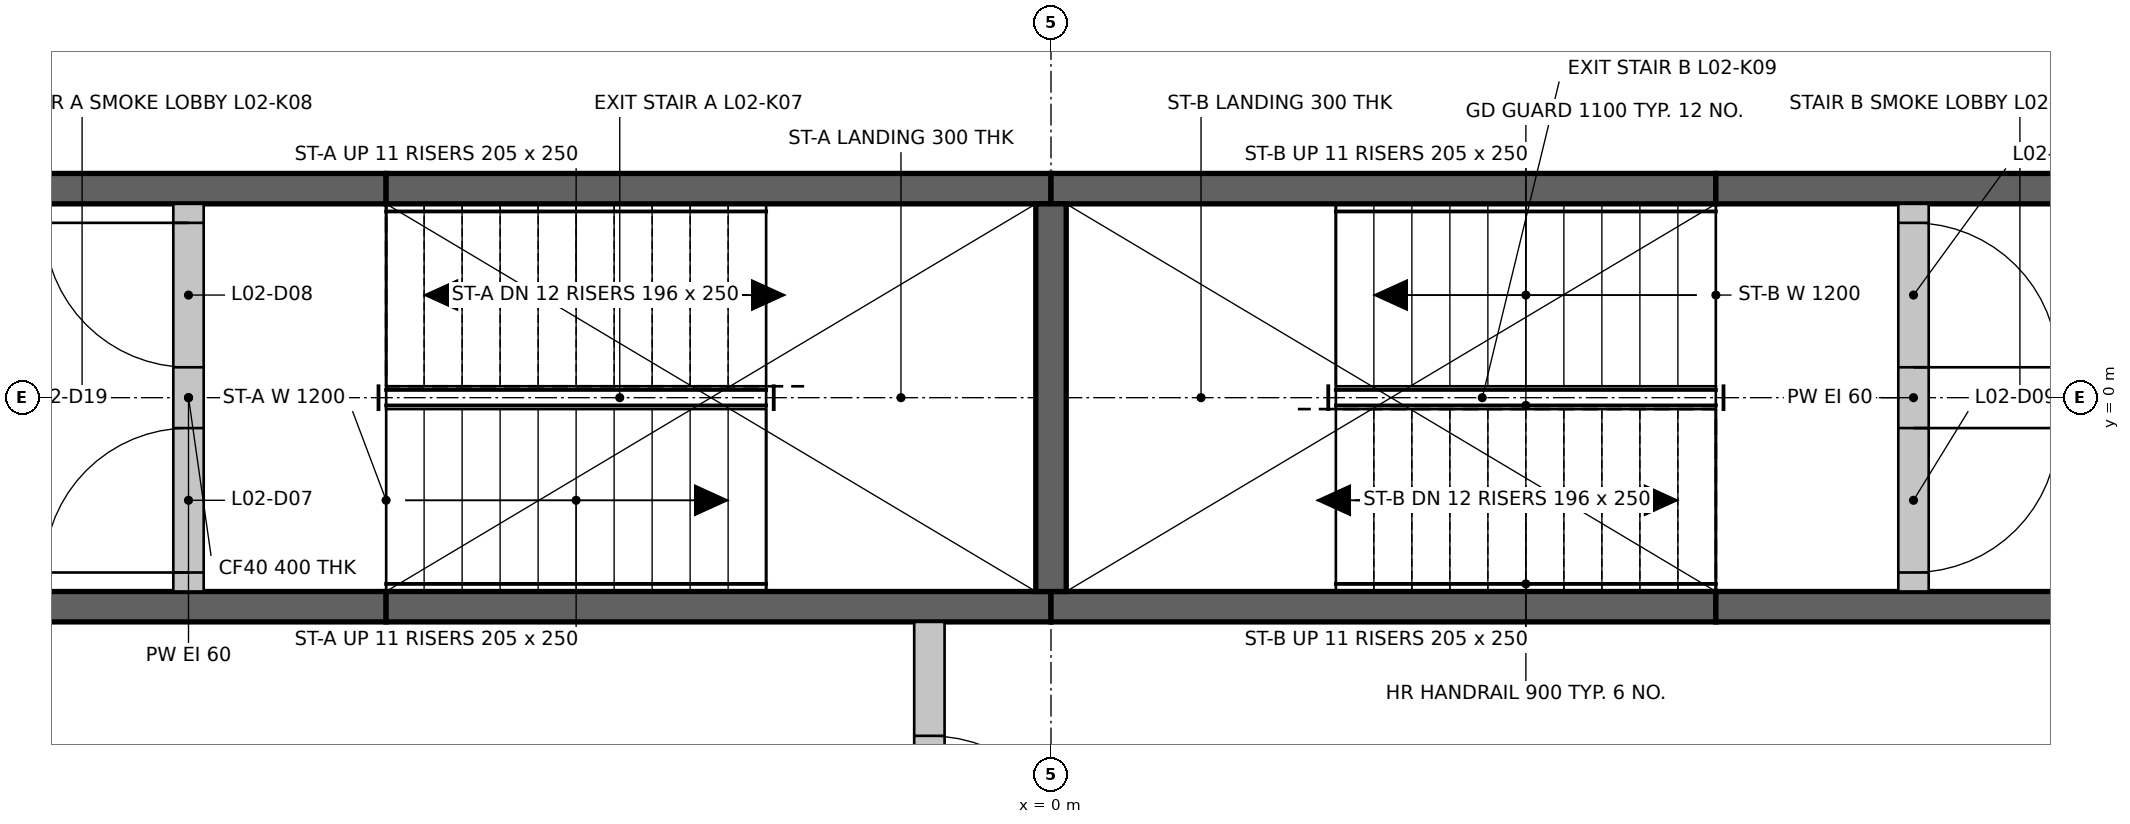
"""IFC4 building model, lengths in metres.
Left out: names, types, materials, properties, quantities, classifications, styles, units other than length and angle.
Written with IfcOpenShell. Run it as: python <this file> out.ifc"""

import sys

from ifc_helpers import new_model, si_unit, direction, frame, frame_2d, origin, place, context, subcontext, project, spatial, rectangle, extrude, element, fill, save


model = new_model("IFC4")
c1 = context("Model", 3, precision=1e-05, world=origin(), true_north=direction((0.0, 1.0)))
c2 = subcontext(c1, "Body", "Model", "MODEL_VIEW")
j1 = project(units=[si_unit("LENGTHUNIT", "METRE"), si_unit("PLANEANGLEUNIT", "RADIAN")], contexts=[c1])
p1 = place(None, origin())
s1 = spatial("IfcSite", under=j1, at=p1, CompositionType="ELEMENT")
p2 = place(p1, origin())
s2 = spatial("IfcBuilding", under=s1, at=p2, CompositionType="ELEMENT")
p3 = place(p2, frame((0.0, 0.0, 9.9)))
s3 = spatial("IfcBuildingStorey", under=s2, at=p3, CompositionType="ELEMENT", Elevation=9.9)
p4 = place(p3, frame((-6.974, -1.375, 0.0), z_axis=(0.0, 0.0, 1.0), x_axis=(1.0, 0.0, 0.0)))
e1 = element("IfcWall", 1, at=p4, inside=s3, PredefinedType="SHEAR", context=c2, shape_type="SweptSolid", body=[
    extrude(rectangle(XDim=2.6, YDim=0.2, at=frame_2d((1.3, 0.0))), origin(), (0.0, 0.0, 1.0), 4.1),
])
for number, where, z_axis, x_axis in (
    (2, (-4.374, -1.375, 0.0), (0.0, 0.0, 1.0), (1.0, 0.0, 0.0)),
    (3, (0.0, -1.375, 0.0), (0.0, 0.0, 1.0), (1.0, 0.0, 0.0)),
):
    element("IfcWall", number, at=place(p3, frame(where, z_axis=z_axis, x_axis=x_axis)), inside=s3, PredefinedType="SHEAR", context=c2, shape_type="SweptSolid", body=[
        extrude(rectangle(XDim=4.374, YDim=0.2, at=frame_2d((2.187, 0.0))), origin(), (0.0, 0.0, 1.0), 4.1),
    ])
for number, where, z_axis, x_axis in (
    (4, (4.374, -1.375, 0.0), (0.0, 0.0, 1.0), (1.0, 0.0, 0.0)),
    (5, (-6.974, 1.375, 0.0), (0.0, 0.0, 1.0), (1.0, 0.0, 0.0)),
):
    element("IfcWall", number, at=place(p3, frame(where, z_axis=z_axis, x_axis=x_axis)), inside=s3, PredefinedType="SHEAR", context=c2, shape_type="SweptSolid", body=[
        extrude(rectangle(XDim=2.6, YDim=0.2, at=frame_2d((1.3, 0.0))), origin(), (0.0, 0.0, 1.0), 4.1),
    ])
for number, where, z_axis, x_axis in (
    (6, (-4.374, 1.375, 0.0), (0.0, 0.0, 1.0), (1.0, 0.0, 0.0)),
    (7, (0.0, 1.375, 0.0), (0.0, 0.0, 1.0), (1.0, 0.0, 0.0)),
):
    element("IfcWall", number, at=place(p3, frame(where, z_axis=z_axis, x_axis=x_axis)), inside=s3, PredefinedType="SHEAR", context=c2, shape_type="SweptSolid", body=[
        extrude(rectangle(XDim=4.374, YDim=0.2, at=frame_2d((2.187, 0.0))), origin(), (0.0, 0.0, 1.0), 4.1),
    ])
p5 = place(p3, frame((4.374, 1.375, 0.0), z_axis=(0.0, 0.0, 1.0), x_axis=(1.0, 0.0, 0.0)))
e8 = element("IfcWall", 8, at=p5, inside=s3, PredefinedType="SHEAR", context=c2, shape_type="SweptSolid", body=[
    extrude(rectangle(XDim=2.6, YDim=0.2, at=frame_2d((1.3, 0.0))), origin(), (0.0, 0.0, 1.0), 4.1),
])
p6 = place(p3, frame((0.0, -1.275, 0.0), z_axis=(0.0, 0.0, 1.0), x_axis=(0.0, 1.0, 0.0)))
e9 = element("IfcWall", 9, at=p6, inside=s3, PredefinedType="SHEAR", context=c2, shape_type="SweptSolid", body=[
    extrude(rectangle(XDim=2.55, YDim=0.2, at=frame_2d((1.275, 0.0))), origin(), (0.0, 0.0, 1.0), 4.1),
])
p7 = place(p3, frame((-0.8, -3.974, 0.0), z_axis=(0.0, 0.0, 1.0), x_axis=(0.0, 1.0, 0.0)))
e10 = element("IfcWall", 10, at=p7, inside=s3, PredefinedType="PARTITIONING", context=c2, shape_type="SweptSolid", body=[
    extrude(rectangle(XDim=2.499, YDim=0.2, at=frame_2d((1.25, 0.0))), origin(), (0.0, 0.0, 1.0), 4.1),
])
p8 = place(p7, frame((0.75, 0.0, 0.0)))
e11 = element("IfcOpeningElement", 11, at=p8, cuts=e10, PredefinedType="OPENING", context=c2, shape_type="SweptSolid", body=[
    extrude(rectangle(XDim=1.0, YDim=2.1, at=frame_2d((0.5, 1.05))), frame((0.0, 0.11, 0.0), z_axis=(0.0, -1.0, 0.0), x_axis=(1.0, 0.0, 0.0)), (0.0, 0.0, 1.0), 0.22),
])
p9 = place(p3, frame((-5.674, -1.275, 0.0), z_axis=(0.0, 0.0, 1.0), x_axis=(0.0, 1.0, 0.0)))
e12 = element("IfcWall", 12, at=p9, inside=s3, PredefinedType="PARTITIONING", context=c2, shape_type="SweptSolid", body=[
    extrude(rectangle(XDim=2.55, YDim=0.2, at=frame_2d((1.275, 0.0))), origin(), (0.0, 0.0, 1.0), 4.1),
])
p10 = place(p9, frame((0.125, 0.0, 0.0)))
e13 = element("IfcOpeningElement", 13, at=p10, cuts=e12, PredefinedType="OPENING", context=c2, shape_type="SweptSolid", body=[
    extrude(rectangle(XDim=0.95, YDim=2.1, at=frame_2d((0.475, 1.05))), frame((0.0, 0.11, 0.0), z_axis=(0.0, -1.0, 0.0), x_axis=(1.0, 0.0, 0.0)), (0.0, 0.0, 1.0), 0.22),
])
p11 = place(p9, frame((1.475, 0.0, 0.0)))
e14 = element("IfcOpeningElement", 14, at=p11, cuts=e12, PredefinedType="OPENING", context=c2, shape_type="SweptSolid", body=[
    extrude(rectangle(XDim=0.95, YDim=2.1, at=frame_2d((0.475, 1.05))), frame((0.0, 0.11, 0.0), z_axis=(0.0, -1.0, 0.0), x_axis=(1.0, 0.0, 0.0)), (0.0, 0.0, 1.0), 0.22),
])
p12 = place(p3, frame((5.674, -1.275, 0.0), z_axis=(0.0, 0.0, 1.0), x_axis=(0.0, 1.0, 0.0)))
e15 = element("IfcWall", 15, at=p12, inside=s3, PredefinedType="PARTITIONING", context=c2, shape_type="SweptSolid", body=[
    extrude(rectangle(XDim=2.55, YDim=0.2, at=frame_2d((1.275, 0.0))), origin(), (0.0, 0.0, 1.0), 4.1),
])
p13 = place(p12, frame((0.125, 0.0, 0.0)))
e16 = element("IfcOpeningElement", 16, at=p13, cuts=e15, PredefinedType="OPENING", context=c2, shape_type="SweptSolid", body=[
    extrude(rectangle(XDim=0.95, YDim=2.1, at=frame_2d((0.475, 1.05))), frame((0.0, 0.11, 0.0), z_axis=(0.0, -1.0, 0.0), x_axis=(1.0, 0.0, 0.0)), (0.0, 0.0, 1.0), 0.22),
])
p14 = place(p12, frame((1.475, 0.0, 0.0)))
e17 = element("IfcOpeningElement", 17, at=p14, cuts=e15, PredefinedType="OPENING", context=c2, shape_type="SweptSolid", body=[
    extrude(rectangle(XDim=0.95, YDim=2.1, at=frame_2d((0.475, 1.05))), frame((0.0, 0.11, 0.0), z_axis=(0.0, -1.0, 0.0), x_axis=(1.0, 0.0, 0.0)), (0.0, 0.0, 1.0), 0.22),
])
p15 = place(p10, origin())
e18 = element("IfcDoor", 18, at=p15, inside=s3, OperationType="SINGLE_SWING_LEFT", PredefinedType="DOOR", context=c2, shape_type="SweptSolid", body=[
    extrude(rectangle(XDim=0.95, YDim=2.1, at=frame_2d((0.475, 1.05))), frame((0.0, 0.025, 0.0), z_axis=(0.0, -1.0, 0.0), x_axis=(1.0, 0.0, 0.0)), (0.0, 0.0, 1.0), 0.05),
])
fill(e13, e18)
p16 = place(p11, origin())
e19 = element("IfcDoor", 19, at=p16, inside=s3, OperationType="SINGLE_SWING_RIGHT", PredefinedType="DOOR", context=c2, shape_type="SweptSolid", body=[
    extrude(rectangle(XDim=0.95, YDim=2.1, at=frame_2d((0.475, 1.05))), frame((0.0, 0.025, 0.0), z_axis=(0.0, -1.0, 0.0), x_axis=(1.0, 0.0, 0.0)), (0.0, 0.0, 1.0), 0.05),
])
fill(e14, e19)
p17 = place(p13, frame((0.95, 0.0, 0.0), z_axis=(0.0, 0.0, 1.0), x_axis=(-1.0, 0.0, 0.0)))
e20 = element("IfcDoor", 20, at=p17, inside=s3, OperationType="SINGLE_SWING_RIGHT", PredefinedType="DOOR", context=c2, shape_type="SweptSolid", body=[
    extrude(rectangle(XDim=0.95, YDim=2.1, at=frame_2d((0.475, 1.05))), frame((0.0, 0.025, 0.0), z_axis=(0.0, -1.0, 0.0), x_axis=(1.0, 0.0, 0.0)), (0.0, 0.0, 1.0), 0.05),
])
fill(e16, e20)
p18 = place(p14, frame((0.95, 0.0, 0.0), z_axis=(0.0, 0.0, 1.0), x_axis=(-1.0, 0.0, 0.0)))
e21 = element("IfcDoor", 21, at=p18, inside=s3, OperationType="SINGLE_SWING_LEFT", PredefinedType="DOOR", context=c2, shape_type="SweptSolid", body=[
    extrude(rectangle(XDim=0.95, YDim=2.1, at=frame_2d((0.475, 1.05))), frame((0.0, 0.025, 0.0), z_axis=(0.0, -1.0, 0.0), x_axis=(1.0, 0.0, 0.0)), (0.0, 0.0, 1.0), 0.05),
])
fill(e17, e21)
p19 = place(p8, frame((1.0, 0.0, 0.0), z_axis=(0.0, 0.0, 1.0), x_axis=(-1.0, 0.0, 0.0)))
e22 = element("IfcDoor", 22, at=p19, inside=s3, OperationType="SINGLE_SWING_LEFT", PredefinedType="DOOR", context=c2, shape_type="SweptSolid", body=[
    extrude(rectangle(XDim=1.0, YDim=2.1, at=frame_2d((0.5, 1.05))), frame((0.0, 0.025, 0.0), z_axis=(0.0, -1.0, 0.0), x_axis=(1.0, 0.0, 0.0)), (0.0, 0.0, 1.0), 0.05),
])
fill(e11, e22)
save(model, sys.argv[1])
